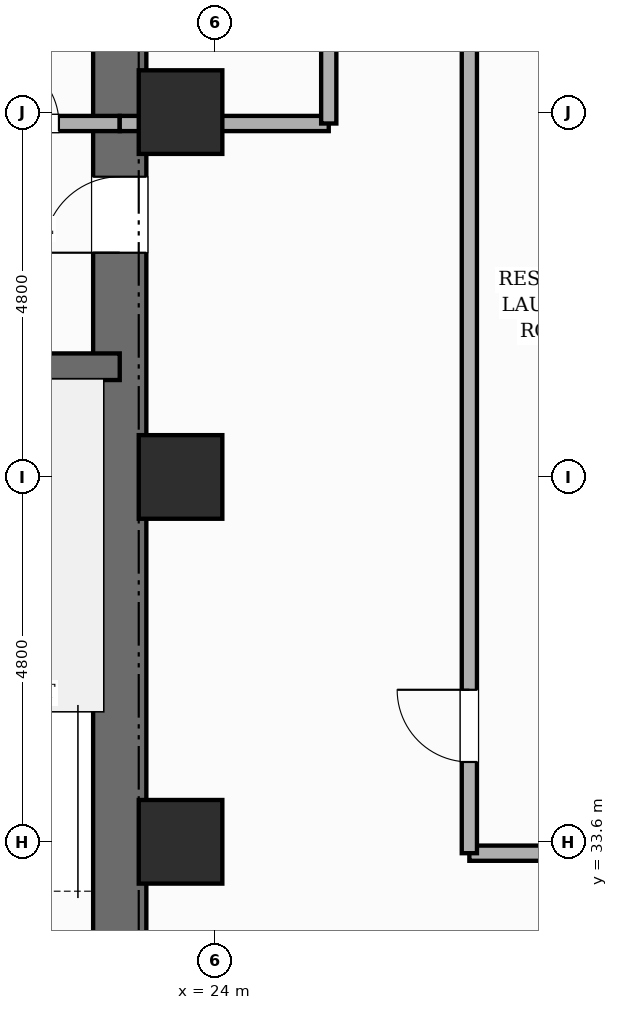
"""IFC4 building model, lengths in metres.
Left out: names, types, materials, properties, quantities, classifications, styles, units other than length and angle.
Written with IfcOpenShell. Run it as: python <this file> out.ifc"""

import sys

from ifc_helpers import new_model, si_unit, direction, frame, frame_2d, origin, origin_2d, place, context, subcontext, project, spatial, rectangle, extrude, element, fill, save


model = new_model("IFC4")
c1 = context("Model", 3, precision=1e-05, world=origin(), true_north=direction((0.0, 1.0)))
c2 = subcontext(c1, "Body", "Model", "MODEL_VIEW")
j1 = project(units=[si_unit("LENGTHUNIT", "METRE"), si_unit("PLANEANGLEUNIT", "RADIAN")], contexts=[c1])
p1 = place(None, origin())
s1 = spatial("IfcSite", under=j1, at=p1, CompositionType="ELEMENT")
p2 = place(p1, origin())
s2 = spatial("IfcBuilding", under=s1, at=p2, CompositionType="ELEMENT")
p3 = place(p2, frame((0.0, 0.0, 57.4)))
s3 = spatial("IfcBuildingStorey", under=s2, at=p3, CompositionType="ELEMENT", Elevation=57.4)
p4 = place(p3, frame((22.75, 30.55, 0.0), z_axis=(0.0, 0.0, 1.0), x_axis=(0.0, 1.0, 0.0)))
e1 = element("IfcWall", 1, at=p4, inside=s3, PredefinedType="SHEAR", context=c2, shape_type="SweptSolid", body=[
    extrude(rectangle(XDim=15.6, YDim=0.7, at=frame_2d((7.8, 0.0))), origin(), (0.0, 0.0, 1.0), 3.6),
])
p5 = place(p4, frame((10.8, 0.0, 0.0)))
e2 = element("IfcOpeningElement", 2, at=p5, cuts=e1, PredefinedType="OPENING", context=c2, shape_type="SweptSolid", body=[
    extrude(rectangle(XDim=1.0, YDim=2.15, at=frame_2d((0.5, 1.075))), frame((0.0, 0.36, 0.0), z_axis=(0.0, -1.0, 0.0), x_axis=(1.0, 0.0, 0.0)), (0.0, 0.0, 1.0), 0.72),
])
p6 = place(p3, frame((18.84, 39.85, 0.0), z_axis=(0.0, 0.0, 1.0), x_axis=(1.0, 0.0, 0.0)))
e3 = element("IfcWall", 3, at=p6, inside=s3, PredefinedType="SHEAR", context=c2, shape_type="SweptSolid", body=[
    extrude(rectangle(XDim=3.91, YDim=0.35, at=frame_2d((1.955, 0.0))), origin(), (0.0, 0.0, 1.0), 3.6),
])
for number, where, z_axis, x_axis in (
    (4, (23.55, 33.6, 0.0), (0.0, 0.0, 1.0), (1.0, 0.0, 0.0)),
    (5, (23.55, 38.4, 0.0), (0.0, 0.0, 1.0), (1.0, 0.0, 0.0)),
    (6, (23.55, 43.2, 0.0), (0.0, 0.0, 1.0), (1.0, 0.0, 0.0)),
):
    element("IfcColumn", number, at=place(p3, frame(where, z_axis=z_axis, x_axis=x_axis)), inside=s3, PredefinedType="COLUMN", context=c2, shape_type="SweptSolid", body=[
        extrude(rectangle(XDim=1.1, YDim=1.1, at=origin_2d()), origin(), (0.0, 0.0, 1.0), 3.6),
    ])
p7 = place(p3, frame((18.84, 43.05, 0.0), z_axis=(0.0, 0.0, 1.0), x_axis=(1.0, 0.0, 0.0)))
e7 = element("IfcWall", 7, at=p7, inside=s3, PredefinedType="POLYGONAL", context=c2, shape_type="SweptSolid", body=[
    extrude(rectangle(XDim=3.91, YDim=0.2, at=frame_2d((1.955, 0.0))), origin(), (0.0, 0.0, 1.0), 2.53),
])
p8 = place(p7, frame((0.55, 0.0, 0.0)))
e8 = element("IfcOpeningElement", 8, at=p8, cuts=e7, PredefinedType="OPENING", context=c2, shape_type="SweptSolid", body=[
    extrude(rectangle(XDim=0.88, YDim=2.1, at=frame_2d((0.44, 1.05))), frame((0.0, 0.11, 0.0), z_axis=(0.0, -1.0, 0.0), x_axis=(1.0, 0.0, 0.0)), (0.0, 0.0, 1.0), 0.22),
])
p9 = place(p7, frame((2.25, 0.0, 0.0)))
e9 = element("IfcOpeningElement", 9, at=p9, cuts=e7, PredefinedType="OPENING", context=c2, shape_type="SweptSolid", body=[
    extrude(rectangle(XDim=0.86, YDim=2.1, at=frame_2d((0.43, 1.05))), frame((0.0, 0.11, 0.0), z_axis=(0.0, -1.0, 0.0), x_axis=(1.0, 0.0, 0.0)), (0.0, 0.0, 1.0), 0.22),
])
p10 = place(p3, frame((27.35, 33.45, 0.0), z_axis=(0.0, 0.0, 1.0), x_axis=(1.0, 0.0, 0.0)))
e10 = element("IfcWall", 10, at=p10, inside=s3, PredefinedType="PARTITIONING", context=c2, shape_type="SweptSolid", body=[
    extrude(rectangle(XDim=14.43, YDim=0.2, at=frame_2d((7.215, 0.0))), origin(), (0.0, 0.0, 1.0), 3.35),
])
p11 = place(p10, frame((4.803, 0.0, 0.0)))
e11 = element("IfcOpeningElement", 11, at=p11, cuts=e10, PredefinedType="OPENING", context=c2, shape_type="SweptSolid", body=[
    extrude(rectangle(XDim=0.98, YDim=2.18, at=frame_2d((0.49, 1.09))), frame((0.0, 0.11, 0.0), z_axis=(0.0, -1.0, 0.0), x_axis=(1.0, 0.0, 0.0)), (0.0, 0.0, 1.0), 0.22),
])
p12 = place(p3, frame((27.35, 33.45, 0.0), z_axis=(0.0, 0.0, 1.0), x_axis=(0.0, 1.0, 0.0)))
e12 = element("IfcWall", 12, at=p12, inside=s3, PredefinedType="PARTITIONING", context=c2, shape_type="SweptSolid", body=[
    extrude(rectangle(XDim=14.23, YDim=0.2, at=frame_2d((7.115, 0.0))), origin(), (0.0, 0.0, 1.0), 3.35),
])
p13 = place(p12, frame((1.2, 0.0, 0.0)))
e13 = element("IfcOpeningElement", 13, at=p13, cuts=e12, PredefinedType="OPENING", context=c2, shape_type="SweptSolid", body=[
    extrude(rectangle(XDim=0.95, YDim=2.15, at=frame_2d((0.475, 1.075))), frame((0.0, 0.11, 0.0), z_axis=(0.0, -1.0, 0.0), x_axis=(1.0, 0.0, 0.0)), (0.0, 0.0, 1.0), 0.22),
])
p14 = place(p3, frame((22.75, 43.05, 0.0), z_axis=(0.0, 0.0, 1.0), x_axis=(1.0, 0.0, 0.0)))
e14 = element("IfcWall", 14, at=p14, inside=s3, PredefinedType="PARTITIONING", context=c2, shape_type="SweptSolid", body=[
    extrude(rectangle(XDim=2.75, YDim=0.2, at=frame_2d((1.375, 0.0))), origin(), (0.0, 0.0, 1.0), 2.53),
])
p15 = place(p3, frame((25.5, 43.05, 0.0), z_axis=(0.0, 0.0, 1.0), x_axis=(0.0, 1.0, 0.0)))
e15 = element("IfcWall", 15, at=p15, inside=s3, PredefinedType="PARTITIONING", context=c2, shape_type="SweptSolid", body=[
    extrude(rectangle(XDim=2.75, YDim=0.2, at=frame_2d((1.375, 0.0))), origin(), (0.0, 0.0, 1.0), 3.35),
])
p16 = place(p5, origin())
e16 = element("IfcDoor", 16, at=p16, inside=s3, OperationType="SINGLE_SWING_LEFT", PredefinedType="DOOR", context=c2, shape_type="SweptSolid", body=[
    extrude(rectangle(XDim=1.0, YDim=2.15, at=frame_2d((0.5, 1.075))), frame((0.0, 0.025, 0.0), z_axis=(0.0, -1.0, 0.0), x_axis=(1.0, 0.0, 0.0)), (0.0, 0.0, 1.0), 0.05),
])
fill(e2, e16)
p17 = place(p9, origin())
e17 = element("IfcDoor", 17, at=p17, inside=s3, OperationType="SINGLE_SWING_LEFT", PredefinedType="DOOR", context=c2, shape_type="SweptSolid", body=[
    extrude(rectangle(XDim=0.86, YDim=2.1, at=frame_2d((0.43, 1.05))), frame((0.0, 0.025, 0.0), z_axis=(0.0, -1.0, 0.0), x_axis=(1.0, 0.0, 0.0)), (0.0, 0.0, 1.0), 0.05),
])
fill(e9, e17)
p18 = place(p13, origin())
e18 = element("IfcDoor", 18, at=p18, inside=s3, OperationType="SINGLE_SWING_RIGHT", PredefinedType="DOOR", context=c2, shape_type="SweptSolid", body=[
    extrude(rectangle(XDim=0.95, YDim=2.15, at=frame_2d((0.475, 1.075))), frame((0.0, 0.025, 0.0), z_axis=(0.0, -1.0, 0.0), x_axis=(1.0, 0.0, 0.0)), (0.0, 0.0, 1.0), 0.05),
])
fill(e13, e18)
save(model, sys.argv[1])
